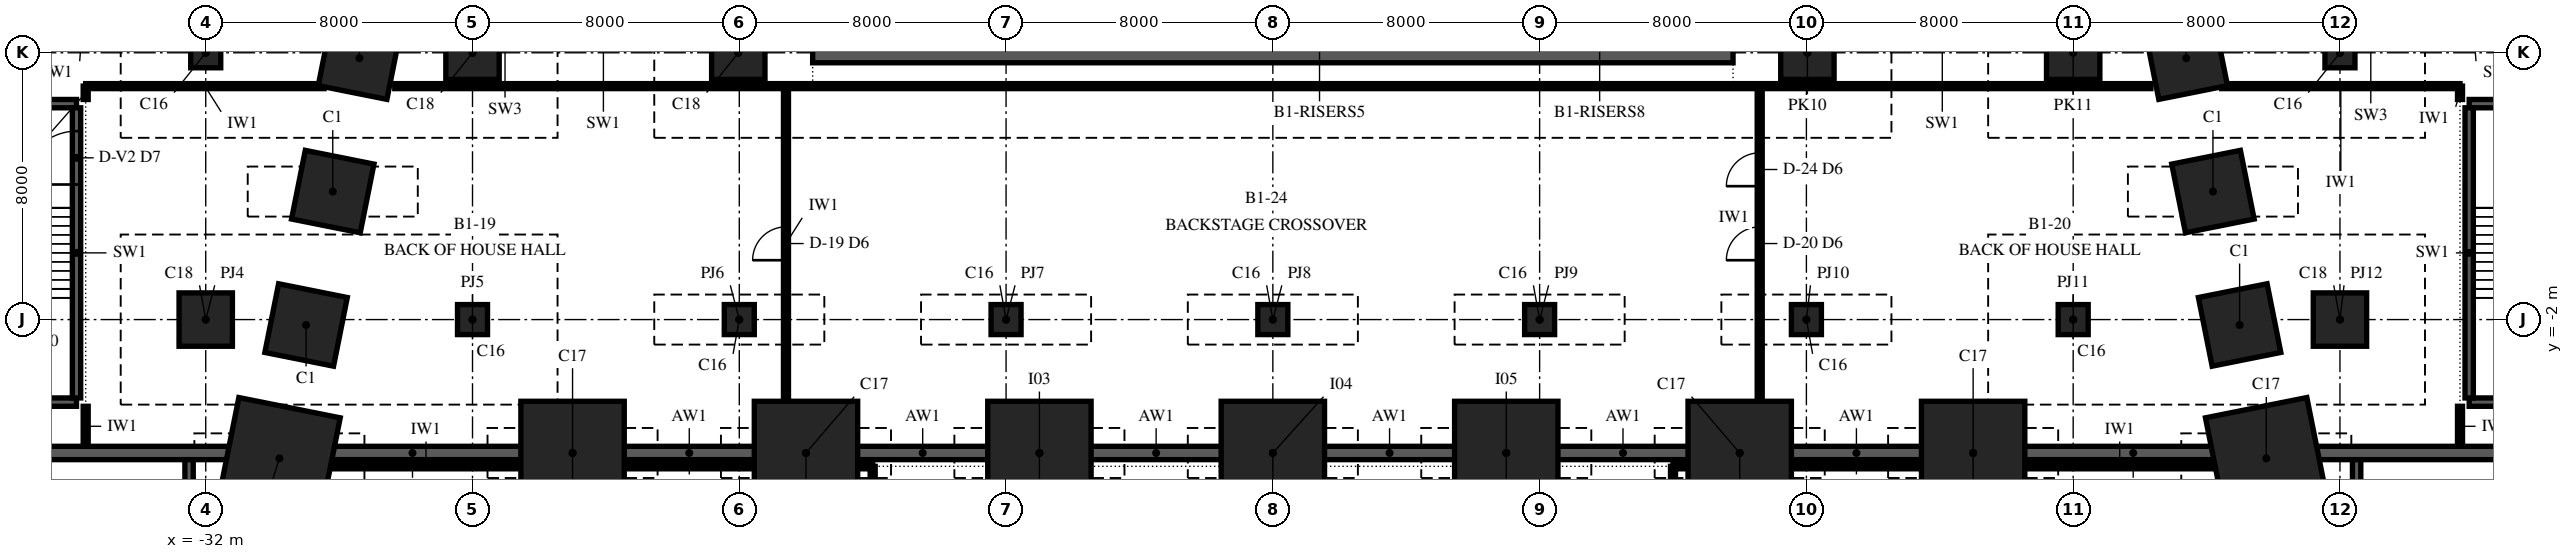
"""IFC4 building model, lengths in metres.
Left out: names, types, materials, properties, quantities, classifications, styles, units other than length and angle.
Written with IfcOpenShell. Run it as: python <this file> out.ifc"""

import sys

from ifc_helpers import new_model, si_unit, direction, frame, frame_2d, origin, origin_2d, place, context, subcontext, project, spatial, rectangle, extrude, element, fill, save


model = new_model("IFC4")
c1 = context("Model", 3, precision=1e-05, world=origin(), true_north=direction((0.0, 1.0)))
c2 = subcontext(c1, "Body", "Model", "MODEL_VIEW")
j1 = project(units=[si_unit("LENGTHUNIT", "METRE"), si_unit("PLANEANGLEUNIT", "RADIAN")], contexts=[c1])
p1 = place(None, origin())
s1 = spatial("IfcSite", under=j1, at=p1, CompositionType="ELEMENT")
p2 = place(p1, origin())
s2 = spatial("IfcBuilding", under=s1, at=p2, CompositionType="ELEMENT")
p3 = place(p2, frame((0.0, 0.0, -7.0)))
s3 = spatial("IfcBuildingStorey", under=s2, at=p3, CompositionType="ELEMENT", Elevation=-7.0)
p4 = place(p3, frame((29.791, -6.162, -0.6), z_axis=(0.0, 0.0, 1.0), x_axis=(-0.196116135138, 0.980580675691, 0.0)))
e1 = element("IfcColumn", 1, at=p4, inside=s3, PredefinedType="COLUMN", context=c2, shape_type="SweptSolid", body=[
    extrude(rectangle(XDim=3.1, YDim=3.1, at=origin_2d()), origin(), (0.0, 0.0, 1.0), 7.6),
])
for number, where, z_axis, x_axis in (
    (2, (28.991, -2.162, -0.6), (0.0, 0.0, 1.0), (-0.196, 0.981, 0.0)),
    (3, (28.191, 1.838, -0.6), (0.0, 0.0, 1.0), (-0.196, 0.981, 0.0)),
    (4, (27.391, 5.838, -0.6), (0.0, 0.0, 1.0), (-0.196, 0.981, 0.0)),
    (5, (-27.391, 5.838, -0.6), (0.0, 0.0, 1.0), (-0.196, -0.981, 0.0)),
    (6, (-28.191, 1.838, -0.6), (0.0, 0.0, 1.0), (-0.196, -0.981, 0.0)),
    (7, (-28.991, -2.162, -0.6), (0.0, 0.0, 1.0), (-0.196, -0.981, 0.0)),
):
    element("IfcColumn", number, at=place(p3, frame(where, z_axis=z_axis, x_axis=x_axis)), inside=s3, PredefinedType="COLUMN", context=c2, shape_type="SweptSolid", body=[
        extrude(rectangle(XDim=2.1, YDim=2.1, at=origin_2d()), origin(), (0.0, 0.0, 1.0), 7.6),
    ])
for number, where, z_axis, x_axis in (
    (8, (-29.791, -6.162, -0.6), (0.0, 0.0, 1.0), (-0.196, -0.981, 0.0)),
    (9, (-21.0, -6.0, -0.6), (0.0, 0.0, 1.0), (1.0, 0.0, 0.0)),
    (10, (-14.0, -6.0, -0.6), (0.0, 0.0, 1.0), (1.0, 0.0, 0.0)),
    (11, (-7.0, -6.0, -0.6), (0.0, 0.0, 1.0), (1.0, 0.0, 0.0)),
    (12, (0.0, -6.0, -0.6), (0.0, 0.0, 1.0), (1.0, 0.0, 0.0)),
    (13, (7.0, -6.0, -0.6), (0.0, 0.0, 1.0), (1.0, 0.0, 0.0)),
    (14, (14.0, -6.0, -0.6), (0.0, 0.0, 1.0), (1.0, 0.0, 0.0)),
    (15, (21.0, -6.0, -0.6), (0.0, 0.0, 1.0), (1.0, 0.0, 0.0)),
):
    element("IfcColumn", number, at=place(p3, frame(where, z_axis=z_axis, x_axis=x_axis)), inside=s3, PredefinedType="COLUMN", context=c2, shape_type="SweptSolid", body=[
        extrude(rectangle(XDim=3.1, YDim=3.1, at=origin_2d()), origin(), (0.0, 0.0, 1.0), 7.6),
    ])
p5 = place(p3, frame((-32.0, -2.0, -0.6), z_axis=(0.0, 0.0, 1.0), x_axis=(1.0, 0.0, 0.0)))
e16 = element("IfcColumn", 16, at=p5, inside=s3, PredefinedType="COLUMN", context=c2, shape_type="SweptSolid", body=[
    extrude(rectangle(XDim=1.6, YDim=1.6, at=origin_2d()), origin(), (0.0, 0.0, 1.0), 7.6),
])
for number, where, z_axis, x_axis in (
    (17, (-32.0, 6.0, -0.6), (0.0, 0.0, 1.0), (1.0, 0.0, 0.0)),
    (18, (-24.0, -2.0, -0.6), (0.0, 0.0, 1.0), (1.0, 0.0, 0.0)),
):
    element("IfcColumn", number, at=place(p3, frame(where, z_axis=z_axis, x_axis=x_axis)), inside=s3, PredefinedType="COLUMN", context=c2, shape_type="SweptSolid", body=[
        extrude(rectangle(XDim=0.9, YDim=0.9, at=origin_2d()), origin(), (0.0, 0.0, 1.0), 7.6),
    ])
p6 = place(p3, frame((-24.0, 6.0, -0.6), z_axis=(0.0, 0.0, 1.0), x_axis=(1.0, 0.0, 0.0)))
e19 = element("IfcColumn", 19, at=p6, inside=s3, PredefinedType="COLUMN", context=c2, shape_type="SweptSolid", body=[
    extrude(rectangle(XDim=1.6, YDim=1.6, at=origin_2d()), origin(), (0.0, 0.0, 1.0), 7.6),
])
p7 = place(p3, frame((-16.0, -2.0, -0.6), z_axis=(0.0, 0.0, 1.0), x_axis=(1.0, 0.0, 0.0)))
e20 = element("IfcColumn", 20, at=p7, inside=s3, PredefinedType="COLUMN", context=c2, shape_type="SweptSolid", body=[
    extrude(rectangle(XDim=0.9, YDim=0.9, at=origin_2d()), origin(), (0.0, 0.0, 1.0), 7.6),
])
p8 = place(p3, frame((-16.03, 6.0, -0.6), z_axis=(0.0, 0.0, 1.0), x_axis=(1.0, 0.0, 0.0)))
e21 = element("IfcColumn", 21, at=p8, inside=s3, PredefinedType="COLUMN", context=c2, shape_type="SweptSolid", body=[
    extrude(rectangle(XDim=1.6, YDim=1.6, at=origin_2d()), origin(), (0.0, 0.0, 1.0), 7.6),
])
for number, where, z_axis, x_axis in (
    (22, (-8.0, -2.0, -0.6), (0.0, 0.0, 1.0), (1.0, 0.0, 0.0)),
    (23, (0.0, -2.0, -0.6), (0.0, 0.0, 1.0), (1.0, 0.0, 0.0)),
    (24, (8.0, -2.0, -0.6), (0.0, 0.0, 1.0), (1.0, 0.0, 0.0)),
    (25, (16.0, -2.0, -0.6), (0.0, 0.0, 1.0), (1.0, 0.0, 0.0)),
):
    element("IfcColumn", number, at=place(p3, frame(where, z_axis=z_axis, x_axis=x_axis)), inside=s3, PredefinedType="COLUMN", context=c2, shape_type="SweptSolid", body=[
        extrude(rectangle(XDim=0.9, YDim=0.9, at=origin_2d()), origin(), (0.0, 0.0, 1.0), 7.6),
    ])
p9 = place(p3, frame((16.03, 6.0, -0.6), z_axis=(0.0, 0.0, 1.0), x_axis=(1.0, 0.0, 0.0)))
e26 = element("IfcColumn", 26, at=p9, inside=s3, PredefinedType="COLUMN", context=c2, shape_type="SweptSolid", body=[
    extrude(rectangle(XDim=1.6, YDim=1.6, at=origin_2d()), origin(), (0.0, 0.0, 1.0), 7.6),
])
p10 = place(p3, frame((24.0, -2.0, -0.6), z_axis=(0.0, 0.0, 1.0), x_axis=(1.0, 0.0, 0.0)))
e27 = element("IfcColumn", 27, at=p10, inside=s3, PredefinedType="COLUMN", context=c2, shape_type="SweptSolid", body=[
    extrude(rectangle(XDim=0.9, YDim=0.9, at=origin_2d()), origin(), (0.0, 0.0, 1.0), 7.6),
])
for number, where, z_axis, x_axis in (
    (28, (24.0, 6.0, -0.6), (0.0, 0.0, 1.0), (1.0, 0.0, 0.0)),
    (29, (32.0, -2.0, -0.6), (0.0, 0.0, 1.0), (1.0, 0.0, 0.0)),
):
    element("IfcColumn", number, at=place(p3, frame(where, z_axis=z_axis, x_axis=x_axis)), inside=s3, PredefinedType="COLUMN", context=c2, shape_type="SweptSolid", body=[
        extrude(rectangle(XDim=1.6, YDim=1.6, at=origin_2d()), origin(), (0.0, 0.0, 1.0), 7.6),
    ])
p11 = place(p3, frame((32.0, 6.0, -0.6), z_axis=(0.0, 0.0, 1.0), x_axis=(1.0, 0.0, 0.0)))
e30 = element("IfcColumn", 30, at=p11, inside=s3, PredefinedType="COLUMN", context=c2, shape_type="SweptSolid", body=[
    extrude(rectangle(XDim=0.9, YDim=0.9, at=origin_2d()), origin(), (0.0, 0.0, 1.0), 7.6),
])
p12 = place(p3, frame((-13.8, 6.2, 0.0), z_axis=(0.0, 0.0, 1.0), x_axis=(1.0, 0.0, 0.0)))
e31 = element("IfcWall", 31, at=p12, inside=s3, PredefinedType="SHEAR", context=c2, shape_type="SweptSolid", body=[
    extrude(rectangle(XDim=27.6, YDim=1.0, at=frame_2d((13.8, 0.0))), origin(), (0.0, 0.0, 1.0), 7.0),
])
p13 = place(p3, frame((-47.375, -6.0, 0.0), z_axis=(0.0, 0.0, 1.0), x_axis=(1.0, 0.0, 0.0)))
e32 = element("IfcWall", 32, at=p13, inside=s3, PredefinedType="SHEAR", context=c2, shape_type="SweptSolid", body=[
    extrude(rectangle(XDim=16.125, YDim=0.4, at=frame_2d((8.062, 0.0))), origin(), (0.0, 0.0, 1.0), 7.0),
])
p14 = place(p3, frame((-29.95, -6.0, 0.0), z_axis=(0.0, 0.0, 1.0), x_axis=(1.0, 0.0, 0.0)))
e33 = element("IfcWall", 33, at=p14, inside=s3, PredefinedType="SHEAR", context=c2, shape_type="SweptSolid", body=[
    extrude(rectangle(XDim=8.3, YDim=0.4, at=frame_2d((4.15, 0.0))), origin(), (0.0, 0.0, 1.0), 7.0),
])
for number, where, z_axis, x_axis in (
    (34, (-20.35, -6.0, 0.0), (0.0, 0.0, 1.0), (1.0, 0.0, 0.0)),
    (35, (-13.35, -6.0, 0.0), (0.0, 0.0, 1.0), (1.0, 0.0, 0.0)),
    (36, (-6.35, -6.0, 0.0), (0.0, 0.0, 1.0), (1.0, 0.0, 0.0)),
    (37, (0.65, -6.0, 0.0), (0.0, 0.0, 1.0), (1.0, 0.0, 0.0)),
    (38, (7.65, -6.0, 0.0), (0.0, 0.0, 1.0), (1.0, 0.0, 0.0)),
    (39, (14.65, -6.0, 0.0), (0.0, 0.0, 1.0), (1.0, 0.0, 0.0)),
):
    element("IfcWall", number, at=place(p3, frame(where, z_axis=z_axis, x_axis=x_axis)), inside=s3, PredefinedType="SHEAR", context=c2, shape_type="SweptSolid", body=[
        extrude(rectangle(XDim=5.7, YDim=0.4, at=frame_2d((2.85, 0.0))), origin(), (0.0, 0.0, 1.0), 7.0),
    ])
p15 = place(p3, frame((21.65, -6.0, 0.0), z_axis=(0.0, 0.0, 1.0), x_axis=(1.0, 0.0, 0.0)))
e40 = element("IfcWall", 40, at=p15, inside=s3, PredefinedType="SHEAR", context=c2, shape_type="SweptSolid", body=[
    extrude(rectangle(XDim=8.3, YDim=0.4, at=frame_2d((4.15, 0.0))), origin(), (0.0, 0.0, 1.0), 7.0),
])
p16 = place(p3, frame((31.25, -6.0, 0.0), z_axis=(0.0, 0.0, 1.0), x_axis=(1.0, 0.0, 0.0)))
e41 = element("IfcWall", 41, at=p16, inside=s3, PredefinedType="SHEAR", context=c2, shape_type="SweptSolid", body=[
    extrude(rectangle(XDim=16.125, YDim=0.4, at=frame_2d((8.062, 0.0))), origin(), (0.0, 0.0, 1.0), 7.0),
])
for number, where, z_axis, x_axis in (
    (42, (35.875, -4.475, 0.0), (0.0, 0.0, 1.0), (1.0, 0.0, 0.0)),
    (43, (42.125, 4.475, 0.0), (0.0, 0.0, 1.0), (-1.0, 0.0, 0.0)),
):
    element("IfcWall", number, at=place(p3, frame(where, z_axis=z_axis, x_axis=x_axis)), inside=s3, PredefinedType="SOLIDWALL", context=c2, shape_type="SweptSolid", body=[
        extrude(rectangle(XDim=6.25, YDim=0.25, at=frame_2d((3.125, 0.0))), origin(), (0.0, 0.0, 1.0), 7.0),
    ])
p17 = place(p3, frame((35.875, 4.35, 0.0), z_axis=(0.0, 0.0, 1.0), x_axis=(0.0, -1.0, 0.0)))
e44 = element("IfcWall", 44, at=p17, inside=s3, PredefinedType="SOLIDWALL", context=c2, shape_type="SweptSolid", body=[
    extrude(rectangle(XDim=8.7, YDim=0.25, at=frame_2d((4.35, 0.0))), origin(), (0.0, 0.0, 1.0), 7.0),
])
for number, where, z_axis, x_axis in (
    (45, (-42.125, -4.475, 0.0), (0.0, 0.0, 1.0), (1.0, 0.0, 0.0)),
    (46, (-35.875, 4.475, 0.0), (0.0, 0.0, 1.0), (-1.0, 0.0, 0.0)),
):
    element("IfcWall", number, at=place(p3, frame(where, z_axis=z_axis, x_axis=x_axis)), inside=s3, PredefinedType="SOLIDWALL", context=c2, shape_type="SweptSolid", body=[
        extrude(rectangle(XDim=6.25, YDim=0.25, at=frame_2d((3.125, 0.0))), origin(), (0.0, 0.0, 1.0), 7.0),
    ])
p18 = place(p3, frame((-35.875, -4.35, 0.0), z_axis=(0.0, 0.0, 1.0), x_axis=(0.0, 1.0, 0.0)))
e47 = element("IfcWall", 47, at=p18, inside=s3, PredefinedType="SOLIDWALL", context=c2, shape_type="SweptSolid", body=[
    extrude(rectangle(XDim=8.7, YDim=0.25, at=frame_2d((4.35, 0.0))), origin(), (0.0, 0.0, 1.0), 7.0),
])
p19 = place(p18, frame((6.4, 0.0, 0.0)))
e48 = element("IfcOpeningElement", 48, at=p19, cuts=e47, PredefinedType="OPENING", context=c2, shape_type="SweptSolid", body=[
    extrude(rectangle(XDim=1.6, YDim=2.1, at=frame_2d((0.8, 1.05))), frame((0.0, 0.14, 0.0), z_axis=(0.0, -1.0, 0.0), x_axis=(1.0, 0.0, 0.0)), (0.0, 0.0, 1.0), 0.28),
])
p20 = place(p3, frame((32.5, -15.9, 0.0), z_axis=(0.0, 0.0, 1.0), x_axis=(0.0, 1.0, 0.0)))
e49 = element("IfcWall", 49, at=p20, inside=s3, PredefinedType="SOLIDWALL", context=c2, shape_type="SweptSolid", body=[
    extrude(rectangle(XDim=9.7, YDim=0.25, at=frame_2d((4.85, 0.0))), origin(), (0.0, 0.0, 1.0), 7.0),
])
p21 = place(p20, frame((1.12, 0.0, 0.0)))
e50 = element("IfcOpeningElement", 50, at=p21, cuts=e49, PredefinedType="OPENING", context=c2, shape_type="SweptSolid", body=[
    extrude(rectangle(XDim=1.8, YDim=2.1, at=frame_2d((0.9, 1.05))), frame((0.0, 0.14, 0.0), z_axis=(0.0, -1.0, 0.0), x_axis=(1.0, 0.0, 0.0)), (0.0, 0.0, 1.0), 0.28),
])
p22 = place(p3, frame((-32.5, -15.9, 0.0), z_axis=(0.0, 0.0, 1.0), x_axis=(0.0, 1.0, 0.0)))
e51 = element("IfcWall", 51, at=p22, inside=s3, PredefinedType="SOLIDWALL", context=c2, shape_type="SweptSolid", body=[
    extrude(rectangle(XDim=9.7, YDim=0.25, at=frame_2d((4.85, 0.0))), origin(), (0.0, 0.0, 1.0), 7.0),
])
p23 = place(p22, frame((1.12, 0.0, 0.0)))
e52 = element("IfcOpeningElement", 52, at=p23, cuts=e51, PredefinedType="OPENING", context=c2, shape_type="SweptSolid", body=[
    extrude(rectangle(XDim=1.8, YDim=2.1, at=frame_2d((0.9, 1.05))), frame((0.0, 0.14, 0.0), z_axis=(0.0, -1.0, 0.0), x_axis=(1.0, 0.0, 0.0)), (0.0, 0.0, 1.0), 0.28),
])
p24 = place(p3, frame((-35.6, -5.8, 0.0), z_axis=(0.0, 0.0, 1.0), x_axis=(0.0, 1.0, 0.0)))
e53 = element("IfcWall", 53, at=p24, inside=s3, PredefinedType="PARTITIONING", context=c2, shape_type="SweptSolid", body=[
    extrude(rectangle(XDim=1.2, YDim=0.15, at=frame_2d((0.6, 0.0))), origin(), (0.0, 0.0, 1.0), 6.7),
])
p25 = place(p3, frame((-35.6, 4.6, 0.0), z_axis=(0.0, 0.0, 1.0), x_axis=(0.0, 1.0, 0.0)))
e54 = element("IfcWall", 54, at=p25, inside=s3, PredefinedType="PARTITIONING", context=c2, shape_type="SweptSolid", body=[
    extrude(rectangle(XDim=0.4, YDim=0.15, at=frame_2d((0.2, 0.0))), origin(), (0.0, 0.0, 1.0), 6.7),
])
p26 = place(p3, frame((-14.6, -4.44, 0.0), z_axis=(0.0, 0.0, 1.0), x_axis=(0.0, 1.0, 0.0)))
e55 = element("IfcWall", 55, at=p26, inside=s3, PredefinedType="PARTITIONING", context=c2, shape_type="SweptSolid", body=[
    extrude(rectangle(XDim=9.44, YDim=0.15, at=frame_2d((4.72, 0.0))), origin(), (0.0, 0.0, 1.0), 6.7),
])
p27 = place(p26, frame((4.22, 0.0, 0.0)))
e56 = element("IfcOpeningElement", 56, at=p27, cuts=e55, PredefinedType="OPENING", context=c2, shape_type="SweptSolid", body=[
    extrude(rectangle(XDim=1.0, YDim=2.1, at=frame_2d((0.5, 1.05))), frame((0.0, 0.09, 0.0), z_axis=(0.0, -1.0, 0.0), x_axis=(1.0, 0.0, 0.0)), (0.0, 0.0, 1.0), 0.18),
])
p28 = place(p3, frame((-12.0, -18.0, 0.0), z_axis=(0.0, 0.0, 1.0), x_axis=(0.0, 1.0, 0.0)))
e57 = element("IfcWall", 57, at=p28, inside=s3, PredefinedType="PARTITIONING", context=c2, shape_type="SweptSolid", body=[
    extrude(rectangle(XDim=11.6, YDim=0.15, at=frame_2d((5.8, 0.0))), origin(), (0.0, 0.0, 1.0), 6.7),
])
p29 = place(p3, frame((12.0, -18.0, 0.0), z_axis=(0.0, 0.0, 1.0), x_axis=(0.0, 1.0, 0.0)))
e58 = element("IfcWall", 58, at=p29, inside=s3, PredefinedType="PARTITIONING", context=c2, shape_type="SweptSolid", body=[
    extrude(rectangle(XDim=11.6, YDim=0.15, at=frame_2d((5.8, 0.0))), origin(), (0.0, 0.0, 1.0), 6.7),
])
p30 = place(p29, frame((5.3, 0.0, 0.0)))
e59 = element("IfcOpeningElement", 59, at=p30, cuts=e58, PredefinedType="OPENING", context=c2, shape_type="SweptSolid", body=[
    extrude(rectangle(XDim=1.0, YDim=2.1, at=frame_2d((0.5, 1.05))), frame((0.0, 0.09, 0.0), z_axis=(0.0, -1.0, 0.0), x_axis=(1.0, 0.0, 0.0)), (0.0, 0.0, 1.0), 0.18),
])
p31 = place(p3, frame((14.6, -4.44, 0.0), z_axis=(0.0, 0.0, 1.0), x_axis=(0.0, 1.0, 0.0)))
e60 = element("IfcWall", 60, at=p31, inside=s3, PredefinedType="PARTITIONING", context=c2, shape_type="SweptSolid", body=[
    extrude(rectangle(XDim=9.44, YDim=0.15, at=frame_2d((4.72, 0.0))), origin(), (0.0, 0.0, 1.0), 6.7),
])
p32 = place(p31, frame((4.22, 0.0, 0.0)))
e61 = element("IfcOpeningElement", 61, at=p32, cuts=e60, PredefinedType="OPENING", context=c2, shape_type="SweptSolid", body=[
    extrude(rectangle(XDim=1.0, YDim=2.1, at=frame_2d((0.5, 1.05))), frame((0.0, 0.09, 0.0), z_axis=(0.0, -1.0, 0.0), x_axis=(1.0, 0.0, 0.0)), (0.0, 0.0, 1.0), 0.18),
])
p33 = place(p31, frame((6.44, 0.0, 0.0)))
e62 = element("IfcOpeningElement", 62, at=p33, cuts=e60, PredefinedType="OPENING", context=c2, shape_type="SweptSolid", body=[
    extrude(rectangle(XDim=1.0, YDim=2.1, at=frame_2d((0.5, 1.05))), frame((0.0, 0.09, 0.0), z_axis=(0.0, -1.0, 0.0), x_axis=(1.0, 0.0, 0.0)), (0.0, 0.0, 1.0), 0.18),
])
p34 = place(p3, frame((35.6, -5.8, 0.0), z_axis=(0.0, 0.0, 1.0), x_axis=(0.0, 1.0, 0.0)))
e63 = element("IfcWall", 63, at=p34, inside=s3, PredefinedType="PARTITIONING", context=c2, shape_type="SweptSolid", body=[
    extrude(rectangle(XDim=1.2, YDim=0.15, at=frame_2d((0.6, 0.0))), origin(), (0.0, 0.0, 1.0), 6.7),
])
p35 = place(p3, frame((35.6, 4.6, 0.0), z_axis=(0.0, 0.0, 1.0), x_axis=(0.0, 1.0, 0.0)))
e64 = element("IfcWall", 64, at=p35, inside=s3, PredefinedType="PARTITIONING", context=c2, shape_type="SweptSolid", body=[
    extrude(rectangle(XDim=0.4, YDim=0.15, at=frame_2d((0.2, 0.0))), origin(), (0.0, 0.0, 1.0), 6.7),
])
p36 = place(p3, frame((-28.231, -6.4, 0.0), z_axis=(0.0, 0.0, 1.0), x_axis=(1.0, 0.0, 0.0)))
e65 = element("IfcWall", 65, at=p36, inside=s3, PredefinedType="PARTITIONING", context=c2, shape_type="SweptSolid", body=[
    extrude(rectangle(XDim=5.671, YDim=0.15, at=frame_2d((2.835, 0.0))), origin(), (0.0, 0.0, 1.0), 6.7),
])
p37 = place(p3, frame((-19.44, -6.4, 0.0), z_axis=(0.0, 0.0, 1.0), x_axis=(1.0, 0.0, 0.0)))
e66 = element("IfcWall", 66, at=p37, inside=s3, PredefinedType="PARTITIONING", context=c2, shape_type="SweptSolid", body=[
    extrude(rectangle(XDim=3.88, YDim=0.15, at=frame_2d((1.94, 0.0))), origin(), (0.0, 0.0, 1.0), 6.7),
])
for number, where, z_axis, x_axis in (
    (67, (-12.44, -6.4, 0.0), (0.0, 0.0, 1.0), (1.0, 0.0, 0.0)),
    (68, (12.0, -6.4, 0.0), (0.0, 0.0, 1.0), (1.0, 0.0, 0.0)),
):
    element("IfcWall", number, at=place(p3, frame(where, z_axis=z_axis, x_axis=x_axis)), inside=s3, PredefinedType="PARTITIONING", context=c2, shape_type="SweptSolid", body=[
        extrude(rectangle(XDim=0.44, YDim=0.15, at=frame_2d((0.22, 0.0))), origin(), (0.0, 0.0, 1.0), 6.7),
    ])
p38 = place(p3, frame((15.56, -6.4, 0.0), z_axis=(0.0, 0.0, 1.0), x_axis=(1.0, 0.0, 0.0)))
e69 = element("IfcWall", 69, at=p38, inside=s3, PredefinedType="PARTITIONING", context=c2, shape_type="SweptSolid", body=[
    extrude(rectangle(XDim=3.88, YDim=0.15, at=frame_2d((1.94, 0.0))), origin(), (0.0, 0.0, 1.0), 6.7),
])
p39 = place(p3, frame((22.56, -6.4, 0.0), z_axis=(0.0, 0.0, 1.0), x_axis=(1.0, 0.0, 0.0)))
e70 = element("IfcWall", 70, at=p39, inside=s3, PredefinedType="PARTITIONING", context=c2, shape_type="SweptSolid", body=[
    extrude(rectangle(XDim=5.671, YDim=0.15, at=frame_2d((2.835, 0.0))), origin(), (0.0, 0.0, 1.0), 6.7),
])
p40 = place(p3, frame((-35.6, 5.0, 0.0), z_axis=(0.0, 0.0, 1.0), x_axis=(1.0, 0.0, 0.0)))
e71 = element("IfcWall", 71, at=p40, inside=s3, PredefinedType="PARTITIONING", context=c2, shape_type="SweptSolid", body=[
    extrude(rectangle(XDim=7.149, YDim=0.15, at=frame_2d((3.575, 0.0))), origin(), (0.0, 0.0, 1.0), 6.7),
])
p41 = place(p3, frame((-26.331, 5.0, 0.0), z_axis=(0.0, 0.0, 1.0), x_axis=(1.0, 0.0, 0.0)))
e72 = element("IfcWall", 72, at=p41, inside=s3, PredefinedType="PARTITIONING", context=c2, shape_type="SweptSolid", body=[
    extrude(rectangle(XDim=52.662, YDim=0.15, at=frame_2d((26.331, 0.0))), origin(), (0.0, 0.0, 1.0), 6.7),
])
p42 = place(p3, frame((28.451, 5.0, 0.0), z_axis=(0.0, 0.0, 1.0), x_axis=(1.0, 0.0, 0.0)))
e73 = element("IfcWall", 73, at=p42, inside=s3, PredefinedType="PARTITIONING", context=c2, shape_type="SweptSolid", body=[
    extrude(rectangle(XDim=7.149, YDim=0.15, at=frame_2d((3.575, 0.0))), origin(), (0.0, 0.0, 1.0), 6.7),
])
p43 = place(p19, origin())
e74 = element("IfcDoor", 74, at=p43, inside=s3, OperationType="DOUBLE_DOOR_SINGLE_SWING", PredefinedType="DOOR", context=c2, shape_type="SweptSolid", body=[
    extrude(rectangle(XDim=1.6, YDim=2.1, at=frame_2d((0.8, 1.05))), frame((0.0, 0.125, 0.0), z_axis=(0.0, -1.0, 0.0), x_axis=(1.0, 0.0, 0.0)), (0.0, 0.0, 1.0), 0.25),
])
fill(e48, e74)
p44 = place(p27, origin())
e75 = element("IfcDoor", 75, at=p44, inside=s3, OperationType="SINGLE_SWING_LEFT", PredefinedType="DOOR", context=c2, shape_type="SweptSolid", body=[
    extrude(rectangle(XDim=1.0, YDim=2.1, at=frame_2d((0.5, 1.05))), frame((0.0, 0.075, 0.0), z_axis=(0.0, -1.0, 0.0), x_axis=(1.0, 0.0, 0.0)), (0.0, 0.0, 1.0), 0.149),
])
fill(e56, e75)
p45 = place(p32, origin())
e76 = element("IfcDoor", 76, at=p45, inside=s3, OperationType="SINGLE_SWING_LEFT", PredefinedType="DOOR", context=c2, shape_type="SweptSolid", body=[
    extrude(rectangle(XDim=1.0, YDim=2.1, at=frame_2d((0.5, 1.05))), frame((0.0, 0.075, 0.0), z_axis=(0.0, -1.0, 0.0), x_axis=(1.0, 0.0, 0.0)), (0.0, 0.0, 1.0), 0.149),
])
fill(e61, e76)
p46 = place(p33, origin())
e77 = element("IfcDoor", 77, at=p46, inside=s3, OperationType="SINGLE_SWING_LEFT", PredefinedType="DOOR", context=c2, shape_type="SweptSolid", body=[
    extrude(rectangle(XDim=1.0, YDim=2.1, at=frame_2d((0.5, 1.05))), frame((0.0, 0.075, 0.0), z_axis=(0.0, -1.0, 0.0), x_axis=(1.0, 0.0, 0.0)), (0.0, 0.0, 1.0), 0.149),
])
fill(e62, e77)
save(model, sys.argv[1])
